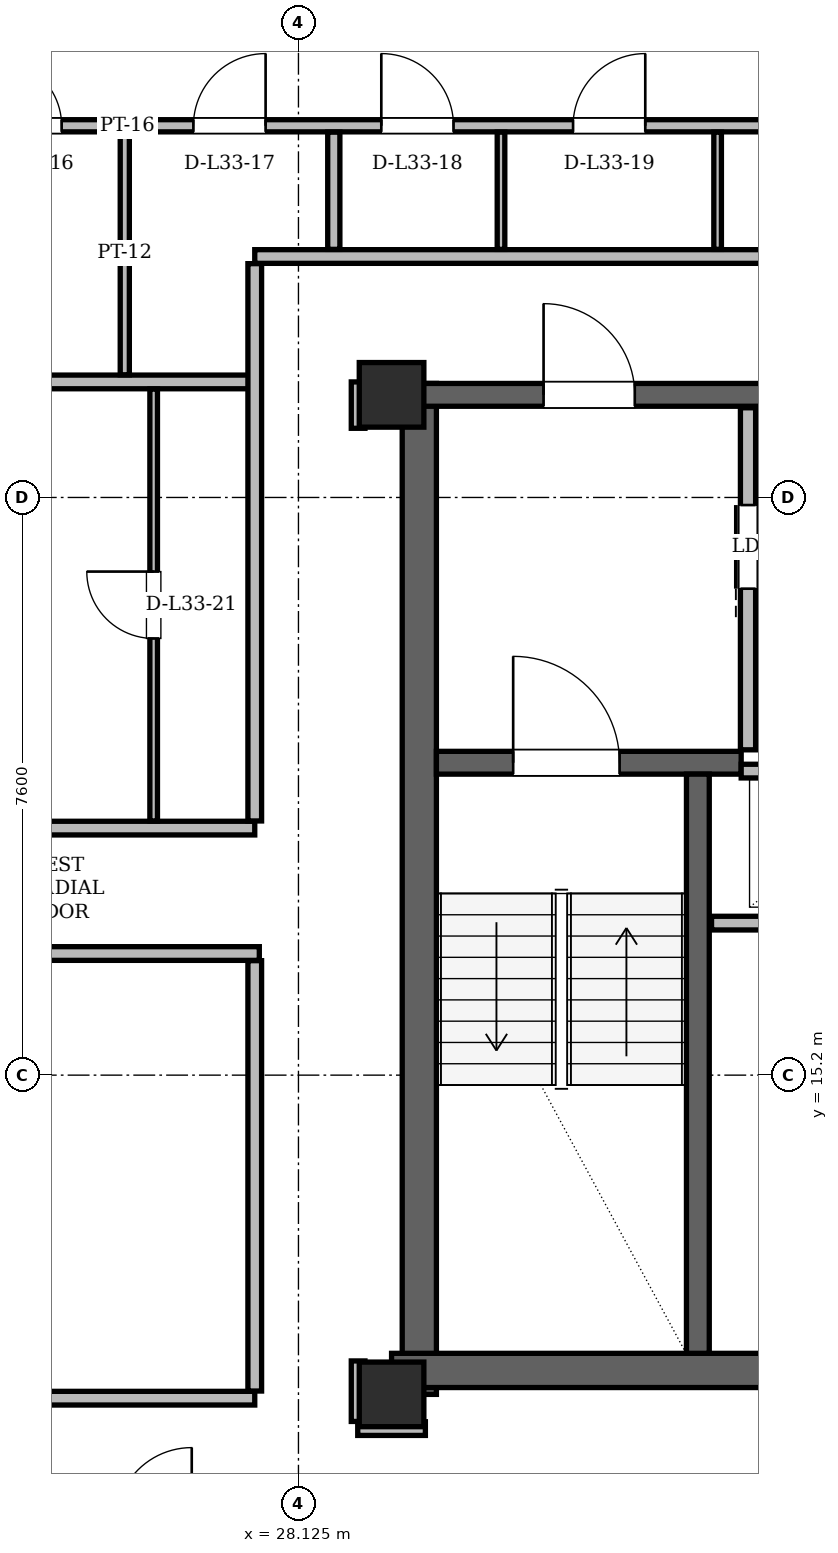
"""IFC4 building model, lengths in metres.
Left out: names, types, materials, properties, quantities, classifications, styles, units other than length and angle.
Written with IfcOpenShell. Run it as: python <this file> out.ifc"""

import sys

from ifc_helpers import new_model, si_unit, direction, frame, frame_2d, origin, origin_2d, place, context, subcontext, project, spatial, rectangle, hollow_rectangle, extrude, element, fill, save


model = new_model("IFC4")
c1 = context("Model", 3, precision=1e-05, world=origin(), true_north=direction((0.0, 1.0)))
c2 = subcontext(c1, "Body", "Model", "MODEL_VIEW")
j1 = project(units=[si_unit("LENGTHUNIT", "METRE"), si_unit("PLANEANGLEUNIT", "RADIAN")], contexts=[c1])
p1 = place(None, origin())
s1 = spatial("IfcSite", under=j1, at=p1, CompositionType="ELEMENT")
p2 = place(p1, origin())
s2 = spatial("IfcBuilding", under=s1, at=p2, CompositionType="ELEMENT")
p3 = place(p2, frame((0.0, 0.0, 126.6)))
s3 = spatial("IfcBuildingStorey", under=s2, at=p3, CompositionType="ELEMENT", Elevation=126.6)
for number, where, z_axis, x_axis in (
    (1, (29.35, 11.0, 0.0), (0.0, 0.0, 1.0), (1.0, 0.0, 0.0)),
    (2, (29.35, 24.15, 0.0), (0.0, 0.0, 1.0), (1.0, 0.0, 0.0)),
):
    element("IfcColumn", number, at=place(p3, frame(where, z_axis=z_axis, x_axis=x_axis)), inside=s3, PredefinedType="COLUMN", context=c2, shape_type="SweptSolid", body=[
        extrude(hollow_rectangle(XDim=0.85, YDim=0.85, WallThickness=0.07, at=origin_2d()), origin(), (0.0, 0.0, 1.0), 3.6),
    ])
p4 = place(p3, frame((29.715, 11.0, 0.0), z_axis=(0.0, 0.0, 1.0), x_axis=(0.0, 1.0, 0.0)))
e3 = element("IfcWall", 3, at=p4, inside=s3, PredefinedType="SHEAR", context=c2, shape_type="SweptSolid", body=[
    extrude(rectangle(XDim=13.3, YDim=0.45, at=frame_2d((6.65, 0.0))), origin(), (0.0, 0.0, 1.0), 3.36),
])
p5 = place(p3, frame((29.35, 11.315, 0.0), z_axis=(0.0, 0.0, 1.0), x_axis=(1.0, 0.0, 0.0)))
e4 = element("IfcWall", 4, at=p5, inside=s3, PredefinedType="SHEAR", context=c2, shape_type="SweptSolid", body=[
    extrude(rectangle(XDim=7.1, YDim=0.45, at=frame_2d((3.55, 0.0))), origin(), (0.0, 0.0, 1.0), 3.36),
])
p6 = place(p3, frame((29.65, 24.15, 0.0), z_axis=(0.0, 0.0, 1.0), x_axis=(1.0, 0.0, 0.0)))
e5 = element("IfcWall", 5, at=p6, inside=s3, PredefinedType="SHEAR", context=c2, shape_type="SweptSolid", body=[
    extrude(rectangle(XDim=15.7, YDim=0.3, at=frame_2d((7.85, 0.0))), origin(), (0.0, 0.0, 1.0), 3.36),
])
p7 = place(p6, frame((1.7, 0.0, 0.0)))
e6 = element("IfcOpeningElement", 6, at=p7, cuts=e5, PredefinedType="OPENING", context=c2, shape_type="SweptSolid", body=[
    extrude(rectangle(XDim=1.2, YDim=2.2, at=frame_2d((0.6, 1.1))), frame((0.0, 0.15, 0.0), z_axis=(0.0, -1.0, 0.0), x_axis=(1.0, 0.0, 0.0)), (0.0, 0.0, 1.0), 0.3),
])
p8 = place(p6, frame((12.8, 0.0, 0.0)))
e7 = element("IfcOpeningElement", 7, at=p8, cuts=e5, PredefinedType="OPENING", context=c2, shape_type="SweptSolid", body=[
    extrude(rectangle(XDim=1.2, YDim=2.2, at=frame_2d((0.6, 1.1))), frame((0.0, 0.15, 0.0), z_axis=(0.0, -1.0, 0.0), x_axis=(1.0, 0.0, 0.0)), (0.0, 0.0, 1.0), 0.3),
])
p9 = place(p6, frame((6.55, 0.0, 0.0)))
e8 = element("IfcOpeningElement", 8, at=p9, cuts=e5, PredefinedType="OPENING", context=c2, shape_type="SweptSolid", body=[
    extrude(rectangle(XDim=0.9, YDim=2.05, at=frame_2d((0.45, 1.025))), frame((0.0, 0.15, 0.0), z_axis=(0.0, -1.0, 0.0), x_axis=(1.0, 0.0, 0.0)), (0.0, 0.0, 1.0), 0.3),
])
p10 = place(p6, frame((8.45, 0.0, 0.0)))
e9 = element("IfcOpeningElement", 9, at=p10, cuts=e5, PredefinedType="OPENING", context=c2, shape_type="SweptSolid", body=[
    extrude(rectangle(XDim=0.9, YDim=2.05, at=frame_2d((0.45, 1.025))), frame((0.0, 0.15, 0.0), z_axis=(0.0, -1.0, 0.0), x_axis=(1.0, 0.0, 0.0)), (0.0, 0.0, 1.0), 0.3),
])
p11 = place(p3, frame((29.94, 19.31, 0.0), z_axis=(0.0, 0.0, 1.0), x_axis=(1.0, 0.0, 0.0)))
e10 = element("IfcWall", 10, at=p11, inside=s3, PredefinedType="SHEAR", context=c2, shape_type="SweptSolid", body=[
    extrude(rectangle(XDim=4.01, YDim=0.3, at=frame_2d((2.005, 0.0))), origin(), (0.0, 0.0, 1.0), 3.36),
])
p12 = place(p11, frame((1.01, 0.0, 0.0)))
e11 = element("IfcOpeningElement", 11, at=p12, cuts=e10, PredefinedType="OPENING", context=c2, shape_type="SweptSolid", body=[
    extrude(rectangle(XDim=1.4, YDim=2.2, at=frame_2d((0.7, 1.1))), frame((0.0, 0.15, 0.0), z_axis=(0.0, -1.0, 0.0), x_axis=(1.0, 0.0, 0.0)), (0.0, 0.0, 1.0), 0.3),
])
p13 = place(p3, frame((33.38, 11.54, 0.0), z_axis=(0.0, 0.0, 1.0), x_axis=(0.0, 1.0, 0.0)))
e12 = element("IfcWall", 12, at=p13, inside=s3, PredefinedType="SHEAR", context=c2, shape_type="SweptSolid", body=[
    extrude(rectangle(XDim=7.62, YDim=0.3, at=frame_2d((3.81, 0.0))), origin(), (0.0, 0.0, 1.0), 3.36),
])
p14 = place(p3, frame((32.214, 43.387, 0.0), z_axis=(0.0, 0.0, 1.0), x_axis=(-0.499998814518, -0.866026088222, 0.0)))
e13 = element("IfcWall", 13, at=p14, inside=s3, PredefinedType="SOLIDWALL", context=c2, shape_type="SweptSolid", body=[
    extrude(rectangle(XDim=35.049, YDim=0.34, at=frame_2d((17.524, 0.0))), origin(), (0.0, 0.0, 1.0), 2.578),
])
p15 = place(p14, frame((8.034, 0.0, 0.0)))
e14 = element("IfcOpeningElement", 14, at=p15, cuts=e13, PredefinedType="OPENING", context=c2, shape_type="SweptSolid", body=[
    extrude(rectangle(XDim=1.5, YDim=2.2, at=frame_2d((0.75, 1.1))), frame((0.0, 0.17, 0.0), z_axis=(0.0, -1.0, 0.0), x_axis=(1.0, 0.0, 0.0)), (0.0, 0.0, 1.0), 0.34),
])
p16 = place(p14, frame((26.97, 0.0, 0.0)))
e15 = element("IfcOpeningElement", 15, at=p16, cuts=e13, PredefinedType="OPENING", context=c2, shape_type="SweptSolid", body=[
    extrude(rectangle(XDim=1.5, YDim=2.2, at=frame_2d((0.75, 1.1))), frame((0.0, 0.17, 0.0), z_axis=(0.0, -1.0, 0.0), x_axis=(1.0, 0.0, 0.0)), (0.0, 0.0, 1.0), 0.34),
])
p17 = place(p14, frame((32.614, 0.0, 0.85)))
e16 = element("IfcOpeningElement", 16, at=p17, cuts=e13, PredefinedType="OPENING", context=c2, shape_type="SweptSolid", body=[
    extrude(rectangle(XDim=1.4, YDim=1.6, at=frame_2d((0.7, 0.8))), frame((0.0, 0.17, 0.0), z_axis=(0.0, -1.0, 0.0), x_axis=(1.0, 0.0, 0.0)), (0.0, 0.0, 1.0), 0.34),
])
p18 = place(p14, frame((22.603, 0.0, 0.85)))
e17 = element("IfcOpeningElement", 17, at=p18, cuts=e13, PredefinedType="OPENING", context=c2, shape_type="SweptSolid", body=[
    extrude(rectangle(XDim=1.2, YDim=1.48, at=frame_2d((0.6, 0.74))), frame((0.0, 0.17, 0.0), z_axis=(0.0, -1.0, 0.0), x_axis=(1.0, 0.0, 0.0)), (0.0, 0.0, 1.0), 0.34),
])
p19 = place(p14, frame((2.414, 0.0, 0.85)))
e18 = element("IfcOpeningElement", 18, at=p19, cuts=e13, PredefinedType="OPENING", context=c2, shape_type="SweptSolid", body=[
    extrude(rectangle(XDim=1.4, YDim=1.6, at=frame_2d((0.7, 0.8))), frame((0.0, 0.17, 0.0), z_axis=(0.0, -1.0, 0.0), x_axis=(1.0, 0.0, 0.0)), (0.0, 0.0, 1.0), 0.34),
])
p20 = place(p14, frame((13.484, 0.0, 0.85)))
e19 = element("IfcOpeningElement", 19, at=p20, cuts=e13, PredefinedType="OPENING", context=c2, shape_type="SweptSolid", body=[
    extrude(rectangle(XDim=2.5, YDim=1.618, at=frame_2d((1.25, 0.809))), frame((0.0, 0.17, 0.0), z_axis=(0.0, -1.0, 0.0), x_axis=(1.0, 0.0, 0.0)), (0.0, 0.0, 1.0), 0.34),
])
p21 = place(p14, frame((18.27, 0.0, 0.85)))
e20 = element("IfcOpeningElement", 20, at=p21, cuts=e13, PredefinedType="OPENING", context=c2, shape_type="SweptSolid", body=[
    extrude(rectangle(XDim=1.2, YDim=1.48, at=frame_2d((0.6, 0.74))), frame((0.0, 0.17, 0.0), z_axis=(0.0, -1.0, 0.0), x_axis=(1.0, 0.0, 0.0)), (0.0, 0.0, 1.0), 0.34),
])
p22 = place(p14, frame((20.466, 0.0, 0.85)))
e21 = element("IfcOpeningElement", 21, at=p22, cuts=e13, PredefinedType="OPENING", context=c2, shape_type="SweptSolid", body=[
    extrude(rectangle(XDim=1.2, YDim=1.48, at=frame_2d((0.6, 0.74))), frame((0.0, 0.17, 0.0), z_axis=(0.0, -1.0, 0.0), x_axis=(1.0, 0.0, 0.0)), (0.0, 0.0, 1.0), 0.34),
])
p23 = place(p3, frame((34.04, 19.48, 0.0), z_axis=(0.0, 0.0, 1.0), x_axis=(0.0, 1.0, 0.0)))
e22 = element("IfcWall", 22, at=p23, inside=s3, PredefinedType="PARTITIONING", context=c2, shape_type="SweptSolid", body=[
    extrude(rectangle(XDim=4.5, YDim=0.2, at=frame_2d((2.25, 0.0))), origin(), (0.0, 0.0, 1.0), 2.4),
])
p24 = place(p23, frame((2.12, 0.0, 0.0)))
e23 = element("IfcOpeningElement", 23, at=p24, cuts=e22, PredefinedType="OPENING", context=c2, shape_type="SweptSolid", body=[
    extrude(rectangle(XDim=1.1, YDim=2.2, at=frame_2d((0.55, 1.1))), frame((0.0, 0.1, 0.0), z_axis=(0.0, -1.0, 0.0), x_axis=(1.0, 0.0, 0.0)), (0.0, 0.0, 1.0), 0.2),
])
p25 = place(p3, frame((34.16, 20.86, 0.0), z_axis=(0.0, 0.0, 1.0), x_axis=(1.0, 0.0, 0.0)))
e24 = element("IfcWall", 24, at=p25, inside=s3, PredefinedType="PARTITIONING", context=c2, shape_type="SweptSolid", body=[
    extrude(rectangle(XDim=1.58, YDim=0.18, at=frame_2d((0.79, 0.0))), origin(), (0.0, 0.0, 1.0), 3.36),
])
p26 = place(p3, frame((33.95, 19.2, 0.0), z_axis=(0.0, 0.0, 1.0), x_axis=(1.0, 0.0, 0.0)))
e25 = element("IfcWall", 25, at=p26, inside=s3, PredefinedType="PARTITIONING", context=c2, shape_type="SweptSolid", body=[
    extrude(rectangle(XDim=2.27, YDim=0.18, at=frame_2d((1.135, 0.0))), origin(), (0.0, 0.0, 1.0), 3.36),
])
p27 = place(p3, frame((33.56, 17.2, 0.0), z_axis=(0.0, 0.0, 1.0), x_axis=(1.0, 0.0, 0.0)))
e26 = element("IfcWall", 26, at=p27, inside=s3, PredefinedType="PARTITIONING", context=c2, shape_type="SweptSolid", body=[
    extrude(rectangle(XDim=2.66, YDim=0.18, at=frame_2d((1.33, 0.0))), origin(), (0.0, 0.0, 1.0), 3.36),
])
p28 = place(p3, frame((28.905, 10.55, 0.0), z_axis=(0.0, 0.0, 1.0), x_axis=(1.0, 0.0, 0.0)))
e27 = element("IfcWall", 27, at=p28, inside=s3, PredefinedType="PARTITIONING", context=c2, shape_type="SweptSolid", body=[
    extrude(rectangle(XDim=0.89, YDim=0.18, at=frame_2d((0.445, 0.0))), origin(), (0.0, 0.0, 1.0), 3.36),
])
p29 = place(p3, frame((19.6, 10.95, 0.0), z_axis=(0.0, 0.0, 1.0), x_axis=(1.0, 0.0, 0.0)))
e28 = element("IfcWall", 28, at=p29, inside=s3, PredefinedType="PARTITIONING", context=c2, shape_type="SweptSolid", body=[
    extrude(rectangle(XDim=7.95, YDim=0.18, at=frame_2d((3.975, 0.0))), origin(), (0.0, 0.0, 1.0), 3.36),
])
p30 = place(p3, frame((17.065, 16.8, 0.0), z_axis=(0.0, 0.0, 1.0), x_axis=(1.0, 0.0, 0.0)))
e29 = element("IfcWall", 29, at=p30, inside=s3, PredefinedType="PARTITIONING", context=c2, shape_type="SweptSolid", body=[
    extrude(rectangle(XDim=10.545, YDim=0.18, at=frame_2d((5.273, 0.0))), origin(), (0.0, 0.0, 1.0), 3.36),
])
p31 = place(p3, frame((18.017, 18.45, 0.0), z_axis=(0.0, 0.0, 1.0), x_axis=(1.0, 0.0, 0.0)))
e30 = element("IfcWall", 30, at=p31, inside=s3, PredefinedType="PARTITIONING", context=c2, shape_type="SweptSolid", body=[
    extrude(rectangle(XDim=9.533, YDim=0.18, at=frame_2d((4.767, 0.0))), origin(), (0.0, 0.0, 1.0), 3.36),
])
p32 = place(p31, frame((2.791, 0.0, 0.0)))
e31 = element("IfcOpeningElement", 31, at=p32, cuts=e30, PredefinedType="OPENING", context=c2, shape_type="SweptSolid", body=[
    extrude(rectangle(XDim=1.0, YDim=2.18, at=frame_2d((0.5, 1.09))), frame((0.0, 0.09, 0.0), z_axis=(0.0, -1.0, 0.0), x_axis=(1.0, 0.0, 0.0)), (0.0, 0.0, 1.0), 0.18),
])
p33 = place(p3, frame((21.406, 24.32, 0.0), z_axis=(0.0, 0.0, 1.0), x_axis=(1.0, 0.0, 0.0)))
e32 = element("IfcWall", 32, at=p33, inside=s3, PredefinedType="PARTITIONING", context=c2, shape_type="SweptSolid", body=[
    extrude(rectangle(XDim=6.204, YDim=0.18, at=frame_2d((3.102, 0.0))), origin(), (0.0, 0.0, 1.0), 3.36),
])
p34 = place(p3, frame((27.55, 25.97, 0.0), z_axis=(0.0, 0.0, 1.0), x_axis=(1.0, 0.0, 0.0)))
e33 = element("IfcWall", 33, at=p34, inside=s3, PredefinedType="PARTITIONING", context=c2, shape_type="SweptSolid", body=[
    extrude(rectangle(XDim=9.15, YDim=0.18, at=frame_2d((4.575, 0.0))), origin(), (0.0, 0.0, 1.0), 2.814),
])
p35 = place(p3, frame((23.352, 27.69, 0.0), z_axis=(0.0, 0.0, 1.0), x_axis=(1.0, 0.0, 0.0)))
e34 = element("IfcWall", 34, at=p35, inside=s3, PredefinedType="PARTITIONING", context=c2, shape_type="SweptSolid", body=[
    extrude(rectangle(XDim=13.398, YDim=0.16, at=frame_2d((6.699, 0.0))), origin(), (0.0, 0.0, 1.0), 2.814),
])
p36 = place(p35, frame((0.777, 0.0, 0.0)))
e35 = element("IfcOpeningElement", 35, at=p36, cuts=e34, PredefinedType="OPENING", context=c2, shape_type="SweptSolid", body=[
    extrude(rectangle(XDim=0.88, YDim=2.08, at=frame_2d((0.44, 1.04))), frame((0.0, 0.08, 0.0), z_axis=(0.0, -1.0, 0.0), x_axis=(1.0, 0.0, 0.0)), (0.0, 0.0, 1.0), 0.16),
])
p37 = place(p35, frame((3.391, 0.0, 0.0)))
e36 = element("IfcOpeningElement", 36, at=p37, cuts=e34, PredefinedType="OPENING", context=c2, shape_type="SweptSolid", body=[
    extrude(rectangle(XDim=0.95, YDim=2.1, at=frame_2d((0.475, 1.05))), frame((0.0, 0.08, 0.0), z_axis=(0.0, -1.0, 0.0), x_axis=(1.0, 0.0, 0.0)), (0.0, 0.0, 1.0), 0.16),
])
p38 = place(p35, frame((5.863, 0.0, 0.0)))
e37 = element("IfcOpeningElement", 37, at=p38, cuts=e34, PredefinedType="OPENING", context=c2, shape_type="SweptSolid", body=[
    extrude(rectangle(XDim=0.95, YDim=2.1, at=frame_2d((0.475, 1.05))), frame((0.0, 0.08, 0.0), z_axis=(0.0, -1.0, 0.0), x_axis=(1.0, 0.0, 0.0)), (0.0, 0.0, 1.0), 0.16),
])
p39 = place(p35, frame((8.386, 0.0, 0.0)))
e38 = element("IfcOpeningElement", 38, at=p39, cuts=e34, PredefinedType="OPENING", context=c2, shape_type="SweptSolid", body=[
    extrude(rectangle(XDim=0.95, YDim=2.1, at=frame_2d((0.475, 1.05))), frame((0.0, 0.08, 0.0), z_axis=(0.0, -1.0, 0.0), x_axis=(1.0, 0.0, 0.0)), (0.0, 0.0, 1.0), 0.16),
])
p40 = place(p35, frame((11.357, 0.0, 0.0)))
e39 = element("IfcOpeningElement", 39, at=p40, cuts=e34, PredefinedType="OPENING", context=c2, shape_type="SweptSolid", body=[
    extrude(rectangle(XDim=0.95, YDim=2.1, at=frame_2d((0.475, 1.05))), frame((0.0, 0.08, 0.0), z_axis=(0.0, -1.0, 0.0), x_axis=(1.0, 0.0, 0.0)), (0.0, 0.0, 1.0), 0.16),
])
p41 = place(p3, frame((25.84, 24.414, 0.0), z_axis=(0.0, 0.0, 1.0), x_axis=(0.0, 1.0, 0.0)))
e40 = element("IfcWall", 40, at=p41, inside=s3, PredefinedType="PARTITIONING", context=c2, shape_type="SweptSolid", body=[
    extrude(rectangle(XDim=3.192, YDim=0.12, at=frame_2d((1.596, 0.0))), origin(), (0.0, 0.0, 1.0), 3.36),
])
p42 = place(p3, frame((26.22, 18.544, 0.0), z_axis=(0.0, 0.0, 1.0), x_axis=(0.0, 1.0, 0.0)))
e41 = element("IfcWall", 41, at=p42, inside=s3, PredefinedType="PARTITIONING", context=c2, shape_type="SweptSolid", body=[
    extrude(rectangle(XDim=5.682, YDim=0.1, at=frame_2d((2.841, 0.0))), origin(), (0.0, 0.0, 1.0), 3.36),
])
p43 = place(p42, frame((2.401, 0.0, 0.0)))
e42 = element("IfcOpeningElement", 42, at=p43, cuts=e41, PredefinedType="OPENING", context=c2, shape_type="SweptSolid", body=[
    extrude(rectangle(XDim=0.88, YDim=2.08, at=frame_2d((0.44, 1.04))), frame((0.0, 0.05, 0.0), z_axis=(0.0, -1.0, 0.0), x_axis=(1.0, 0.0, 0.0)), (0.0, 0.0, 1.0), 0.1),
])
p44 = place(p3, frame((27.55, 11.044, 0.0), z_axis=(0.0, 0.0, 1.0), x_axis=(0.0, 1.0, 0.0)))
e43 = element("IfcWall", 43, at=p44, inside=s3, PredefinedType="PARTITIONING", context=c2, shape_type="SweptSolid", body=[
    extrude(rectangle(XDim=5.662, YDim=0.18, at=frame_2d((2.831, 0.0))), origin(), (0.0, 0.0, 1.0), 2.814),
])
p45 = place(p3, frame((27.55, 18.544, 0.0), z_axis=(0.0, 0.0, 1.0), x_axis=(0.0, 1.0, 0.0)))
e44 = element("IfcWall", 44, at=p45, inside=s3, PredefinedType="PARTITIONING", context=c2, shape_type="SweptSolid", body=[
    extrude(rectangle(XDim=7.332, YDim=0.18, at=frame_2d((3.666, 0.0))), origin(), (0.0, 0.0, 1.0), 3.36),
])
p46 = place(p3, frame((28.59, 26.064, 0.0), z_axis=(0.0, 0.0, 1.0), x_axis=(0.0, 1.0, 0.0)))
e45 = element("IfcWall", 45, at=p46, inside=s3, PredefinedType="PARTITIONING", context=c2, shape_type="SweptSolid", body=[
    extrude(rectangle(XDim=1.542, YDim=0.16, at=frame_2d((0.771, 0.0))), origin(), (0.0, 0.0, 1.0), 3.36),
])
p47 = place(p3, frame((28.91, 10.644, 0.0), z_axis=(0.0, 0.0, 1.0), x_axis=(0.0, 1.0, 0.0)))
e46 = element("IfcWall", 46, at=p47, inside=s3, PredefinedType="PARTITIONING", context=c2, shape_type="SweptSolid", body=[
    extrude(rectangle(XDim=0.796, YDim=0.18, at=frame_2d((0.398, 0.0))), origin(), (0.0, 0.0, 1.0), 2.814),
])
p48 = place(p3, frame((28.91, 23.71, 0.0), z_axis=(0.0, 0.0, 1.0), x_axis=(0.0, 1.0, 0.0)))
e47 = element("IfcWall", 47, at=p48, inside=s3, PredefinedType="PARTITIONING", context=c2, shape_type="SweptSolid", body=[
    extrude(rectangle(XDim=0.61, YDim=0.18, at=frame_2d((0.305, 0.0))), origin(), (0.0, 0.0, 1.0), 3.36),
])
for number, where, z_axis, x_axis in (
    (48, (30.79, 26.064, 0.0), (0.0, 0.0, 1.0), (0.0, 1.0, 0.0)),
    (49, (33.64, 26.064, 0.0), (0.0, 0.0, 1.0), (0.0, 1.0, 0.0)),
):
    element("IfcWall", number, at=place(p3, frame(where, z_axis=z_axis, x_axis=x_axis)), inside=s3, PredefinedType="PARTITIONING", context=c2, shape_type="SweptSolid", body=[
        extrude(rectangle(XDim=1.542, YDim=0.1, at=frame_2d((0.771, 0.0))), origin(), (0.0, 0.0, 1.0), 3.36),
    ])
p49 = place(p24, origin())
e50 = element("IfcDoor", 50, at=p49, inside=s3, OperationType="SLIDING_TO_LEFT", PredefinedType="DOOR", context=c2, shape_type="SweptSolid", body=[
    extrude(rectangle(XDim=1.1, YDim=2.2, at=frame_2d((0.55, 1.1))), frame((0.0, 0.025, 0.0), z_axis=(0.0, -1.0, 0.0), x_axis=(1.0, 0.0, 0.0)), (0.0, 0.0, 1.0), 0.05),
])
fill(e23, e50)
p50 = place(p12, origin())
e51 = element("IfcDoor", 51, at=p50, inside=s3, OperationType="SINGLE_SWING_LEFT", PredefinedType="DOOR", context=c2, shape_type="SweptSolid", body=[
    extrude(rectangle(XDim=1.4, YDim=2.2, at=frame_2d((0.7, 1.1))), frame((0.0, 0.025, 0.0), z_axis=(0.0, -1.0, 0.0), x_axis=(1.0, 0.0, 0.0)), (0.0, 0.0, 1.0), 0.05),
])
fill(e11, e51)
p51 = place(p7, origin())
e52 = element("IfcDoor", 52, at=p51, inside=s3, OperationType="SINGLE_SWING_LEFT", PredefinedType="DOOR", context=c2, shape_type="SweptSolid", body=[
    extrude(rectangle(XDim=1.2, YDim=2.2, at=frame_2d((0.6, 1.1))), frame((0.0, 0.025, 0.0), z_axis=(0.0, -1.0, 0.0), x_axis=(1.0, 0.0, 0.0)), (0.0, 0.0, 1.0), 0.05),
])
fill(e6, e52)
p52 = place(p36, origin())
e53 = element("IfcDoor", 53, at=p52, inside=s3, OperationType="SINGLE_SWING_LEFT", PredefinedType="DOOR", context=c2, shape_type="SweptSolid", body=[
    extrude(rectangle(XDim=0.88, YDim=2.08, at=frame_2d((0.44, 1.04))), frame((0.0, 0.025, 0.0), z_axis=(0.0, -1.0, 0.0), x_axis=(1.0, 0.0, 0.0)), (0.0, 0.0, 1.0), 0.05),
])
fill(e35, e53)
p53 = place(p37, origin())
e54 = element("IfcDoor", 54, at=p53, inside=s3, OperationType="SINGLE_SWING_RIGHT", PredefinedType="DOOR", context=c2, shape_type="SweptSolid", body=[
    extrude(rectangle(XDim=0.95, YDim=2.1, at=frame_2d((0.475, 1.05))), frame((0.0, 0.025, 0.0), z_axis=(0.0, -1.0, 0.0), x_axis=(1.0, 0.0, 0.0)), (0.0, 0.0, 1.0), 0.05),
])
fill(e36, e54)
p54 = place(p38, origin())
e55 = element("IfcDoor", 55, at=p54, inside=s3, OperationType="SINGLE_SWING_LEFT", PredefinedType="DOOR", context=c2, shape_type="SweptSolid", body=[
    extrude(rectangle(XDim=0.95, YDim=2.1, at=frame_2d((0.475, 1.05))), frame((0.0, 0.025, 0.0), z_axis=(0.0, -1.0, 0.0), x_axis=(1.0, 0.0, 0.0)), (0.0, 0.0, 1.0), 0.05),
])
fill(e37, e55)
p55 = place(p39, origin())
e56 = element("IfcDoor", 56, at=p55, inside=s3, OperationType="SINGLE_SWING_RIGHT", PredefinedType="DOOR", context=c2, shape_type="SweptSolid", body=[
    extrude(rectangle(XDim=0.95, YDim=2.1, at=frame_2d((0.475, 1.05))), frame((0.0, 0.025, 0.0), z_axis=(0.0, -1.0, 0.0), x_axis=(1.0, 0.0, 0.0)), (0.0, 0.0, 1.0), 0.05),
])
fill(e38, e56)
p56 = place(p43, origin())
e57 = element("IfcDoor", 57, at=p56, inside=s3, OperationType="SINGLE_SWING_RIGHT", PredefinedType="DOOR", context=c2, shape_type="SweptSolid", body=[
    extrude(rectangle(XDim=0.88, YDim=2.08, at=frame_2d((0.44, 1.04))), frame((0.0, 0.025, 0.0), z_axis=(0.0, -1.0, 0.0), x_axis=(1.0, 0.0, 0.0)), (0.0, 0.0, 1.0), 0.05),
])
fill(e42, e57)
save(model, sys.argv[1])
